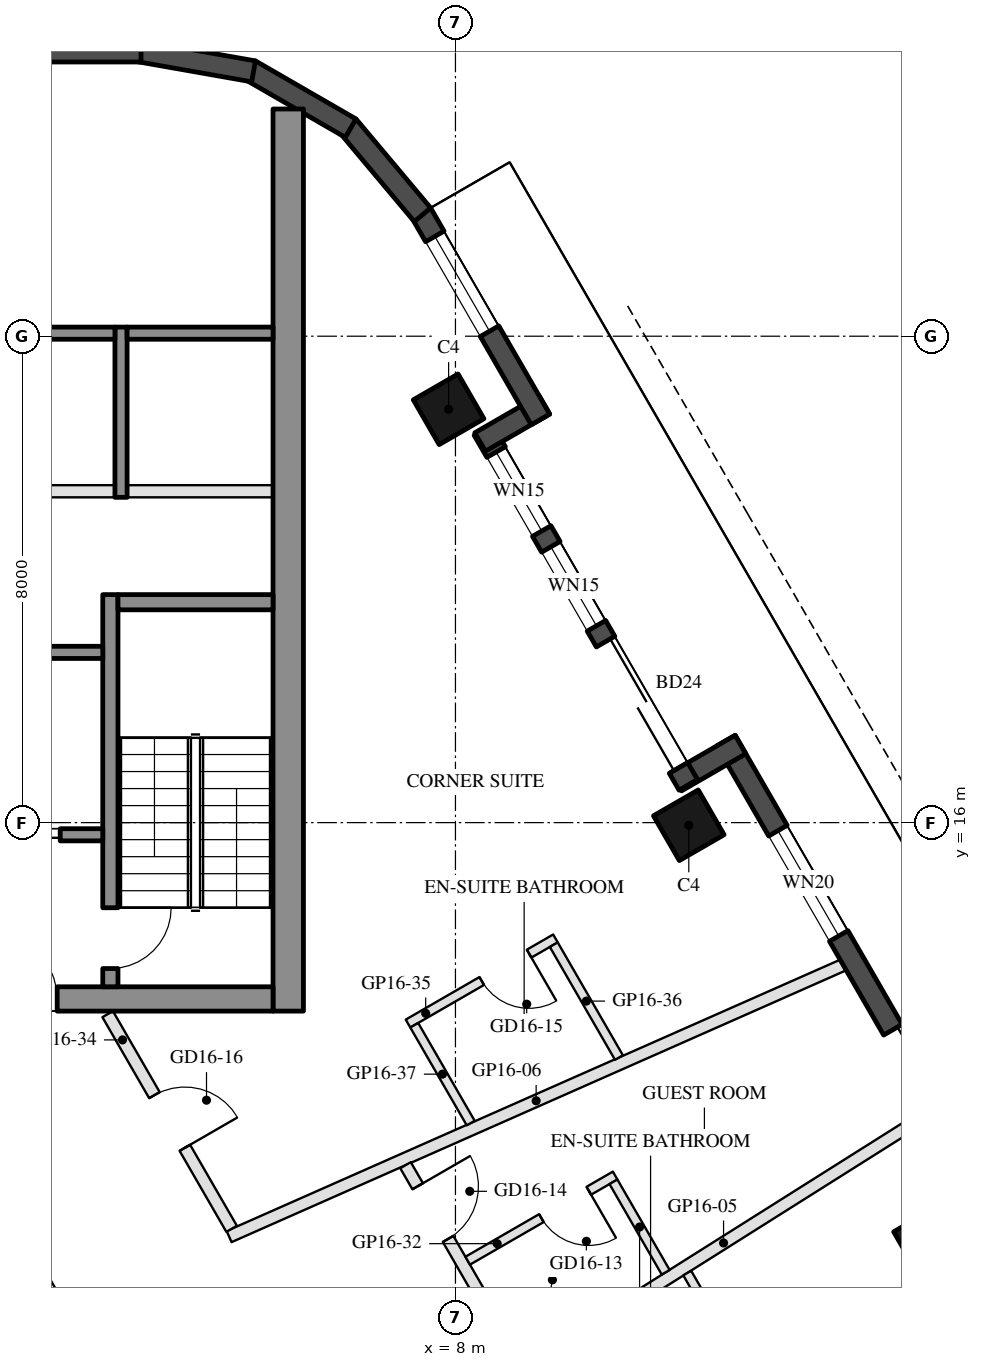
"""IFC4 building model, lengths in metres.
Left out: names, types, materials, properties, quantities, classifications, styles, units other than length and angle.
Written with IfcOpenShell. Run it as: python <this file> out.ifc"""

import sys

from ifc_helpers import new_model, si_unit, direction, frame, frame_2d, origin, origin_2d, place, context, subcontext, project, spatial, rectangle, hollow_rectangle, extrude, element, fill, save


model = new_model("IFC4")
c1 = context("Model", 3, precision=1e-05, world=origin(), true_north=direction((0.0, 1.0)))
c2 = subcontext(c1, "Body", "Model", "MODEL_VIEW")
j1 = project(units=[si_unit("LENGTHUNIT", "METRE"), si_unit("PLANEANGLEUNIT", "RADIAN")], contexts=[c1])
p1 = place(None, origin())
s1 = spatial("IfcSite", under=j1, at=p1, CompositionType="ELEMENT")
p2 = place(p1, origin())
s2 = spatial("IfcBuilding", under=s1, at=p2, CompositionType="ELEMENT")
p3 = place(p2, frame((0.0, 0.0, 176.2)))
s3 = spatial("IfcBuildingStorey", under=s2, at=p3, CompositionType="ELEMENT", Elevation=176.2)
for number, where, z_axis, x_axis in (
    (1, (15.788, 9.115, 0.0), (0.0, 0.0, 1.0), (-0.5, 0.866, 0.0)),
    (2, (11.838, 15.957, 0.0), (0.0, 0.0, 1.0), (-0.5, 0.866, 0.0)),
    (3, (7.888, 22.798, 0.0), (0.0, 0.0, 1.0), (-0.5, 0.866, 0.0)),
):
    element("IfcColumn", number, at=place(p3, frame(where, z_axis=z_axis, x_axis=x_axis)), inside=s3, PredefinedType="COLUMN", context=c2, shape_type="SweptSolid", body=[
        extrude(hollow_rectangle(XDim=0.85, YDim=0.85, WallThickness=0.04, at=origin_2d()), origin(), (0.0, 0.0, 1.0), 3.7),
    ])
p4 = place(p3, frame((17.299, 8.948, 0.0), z_axis=(0.0, 0.0, 1.0), x_axis=(-0.500010041276, 0.866019606374, 0.0)))
e4 = element("IfcWall", 4, at=p4, inside=s3, PredefinedType="SOLIDWALL", context=c2, shape_type="SweptSolid", body=[
    extrude(rectangle(XDim=9.7, YDim=0.35, at=frame_2d((4.85, 0.0))), origin(), (0.0, 0.0, 1.0), 3.55),
])
p5 = place(p4, frame((3.21, 0.0, 0.0)))
e5 = element("IfcOpeningElement", 5, at=p5, cuts=e4, PredefinedType="OPENING", context=c2, shape_type="SweptSolid", body=[
    extrude(rectangle(XDim=1.0, YDim=2.4, at=frame_2d((0.5, 1.2))), frame((0.0, 0.185, 0.0), z_axis=(0.0, -1.0, 0.0), x_axis=(1.0, 0.0, 0.0)), (0.0, 0.0, 1.0), 0.37),
])
p6 = place(p4, frame((5.99, 0.0, 0.3)))
e6 = element("IfcOpeningElement", 6, at=p6, cuts=e4, PredefinedType="OPENING", context=c2, shape_type="SweptSolid", body=[
    extrude(rectangle(XDim=2.0, YDim=2.65, at=frame_2d((1.0, 1.325))), frame((0.0, 0.185, 0.0), z_axis=(0.0, -1.0, 0.0), x_axis=(1.0, 0.0, 0.0)), (0.0, 0.0, 1.0), 0.37),
])
p7 = place(p3, frame((12.688, 17.284, 0.0), z_axis=(0.0, 0.0, 1.0), x_axis=(-0.865955602162, -0.500120880472, 0.0)))
e7 = element("IfcWall", 7, at=p7, inside=s3, PredefinedType="SOLIDWALL", context=c2, shape_type="SweptSolid", body=[
    extrude(rectangle(XDim=1.22, YDim=0.35, at=frame_2d((0.61, 0.0))), origin(), (0.0, 0.0, 1.0), 3.55),
])
p8 = place(p3, frame((11.829, 16.621, 0.0), z_axis=(0.0, 0.0, 1.0), x_axis=(-0.500003597184, 0.866023326939, 0.0)))
e8 = element("IfcWall", 8, at=p8, inside=s3, PredefinedType="SOLIDWALL", context=c2, shape_type="SweptSolid", body=[
    extrude(rectangle(XDim=6.74, YDim=0.35, at=frame_2d((3.37, 0.0))), origin(), (0.0, 0.0, 1.0), 3.55),
])
p9 = place(p8, frame((0.32, 0.0, 0.0)))
e9 = element("IfcOpeningElement", 9, at=p9, cuts=e8, PredefinedType="OPENING", context=c2, shape_type="SweptSolid", body=[
    extrude(rectangle(XDim=2.4, YDim=2.4, at=frame_2d((1.2, 1.2))), frame((0.0, 0.185, 0.0), z_axis=(0.0, -1.0, 0.0), x_axis=(1.0, 0.0, 0.0)), (0.0, 0.0, 1.0), 0.37),
])
p10 = place(p8, frame((3.02, 0.0, 0.3)))
e10 = element("IfcOpeningElement", 10, at=p10, cuts=e8, PredefinedType="OPENING", context=c2, shape_type="SweptSolid", body=[
    extrude(rectangle(XDim=1.5, YDim=2.65, at=frame_2d((0.75, 1.325))), frame((0.0, 0.185, 0.0), z_axis=(0.0, -1.0, 0.0), x_axis=(1.0, 0.0, 0.0)), (0.0, 0.0, 1.0), 0.37),
])
p11 = place(p8, frame((4.82, 0.0, 0.3)))
e11 = element("IfcOpeningElement", 11, at=p11, cuts=e8, PredefinedType="OPENING", context=c2, shape_type="SweptSolid", body=[
    extrude(rectangle(XDim=1.5, YDim=2.65, at=frame_2d((0.75, 1.325))), frame((0.0, 0.185, 0.0), z_axis=(0.0, -1.0, 0.0), x_axis=(1.0, 0.0, 0.0)), (0.0, 0.0, 1.0), 0.37),
])
p12 = place(p3, frame((8.406, 22.26, 0.0), z_axis=(0.0, 0.0, 1.0), x_axis=(0.865955602162, 0.500120880472, 0.0)))
e12 = element("IfcWall", 12, at=p12, inside=s3, PredefinedType="SOLIDWALL", context=c2, shape_type="SweptSolid", body=[
    extrude(rectangle(XDim=1.22, YDim=0.35, at=frame_2d((0.61, 0.0))), origin(), (0.0, 0.0, 1.0), 3.55),
])
p13 = place(p3, frame((9.398, 22.631, 0.0), z_axis=(0.0, 0.0, 1.0), x_axis=(-0.499954521343, 0.866051659307, 0.0)))
e13 = element("IfcWall", 13, at=p13, inside=s3, PredefinedType="SOLIDWALL", context=c2, shape_type="SweptSolid", body=[
    extrude(rectangle(XDim=3.916, YDim=0.35, at=frame_2d((1.958, 0.0))), origin(), (0.0, 0.0, 1.0), 3.55),
])
p14 = place(p13, frame((1.675, 0.0, 0.3)))
e14 = element("IfcOpeningElement", 14, at=p14, cuts=e13, PredefinedType="OPENING", context=c2, shape_type="SweptSolid", body=[
    extrude(rectangle(XDim=1.8, YDim=2.65, at=frame_2d((0.9, 1.325))), frame((0.0, 0.185, 0.0), z_axis=(0.0, -1.0, 0.0), x_axis=(1.0, 0.0, 0.0)), (0.0, 0.0, 1.0), 0.37),
])
p15 = place(p3, frame((7.458, 25.998, 0.0), z_axis=(0.0, 0.0, 1.0), x_axis=(-0.642808304945, 0.766027077259, 0.0)))
e15 = element("IfcWall", 15, at=p15, inside=s3, PredefinedType="SOLIDWALL", context=c2, shape_type="SweptSolid", body=[
    extrude(rectangle(XDim=1.91, YDim=0.35, at=frame_2d((0.955, 0.0))), origin(), (0.0, 0.0, 1.0), 3.55),
])
for number, where, z_axis, x_axis in (
    (16, (6.277, 27.422, 0.0), (0.0, 0.0, 1.0), (-0.866, 0.5, 0.0)),
    (17, (4.68, 28.356, 0.0), (0.0, 0.0, 1.0), (-0.985, 0.174, 0.0)),
):
    element("IfcWall", number, at=place(p3, frame(where, z_axis=z_axis, x_axis=x_axis)), inside=s3, PredefinedType="SOLIDWALL", context=c2, shape_type="SweptSolid", body=[
        extrude(rectangle(XDim=1.91, YDim=0.35, at=frame_2d((0.955, 0.0))), origin(), (0.0, 0.0, 1.0), 3.55),
    ])
p16 = place(p3, frame((2.829, 28.685, 0.0), z_axis=(0.0, 0.0, 1.0), x_axis=(-1.0, 0.0, 0.0)))
e18 = element("IfcWall", 18, at=p16, inside=s3, PredefinedType="SOLIDWALL", context=c2, shape_type="SweptSolid", body=[
    extrude(rectangle(XDim=5.658, YDim=0.35, at=frame_2d((2.829, 0.0))), origin(), (0.0, 0.0, 1.0), 3.55),
])
p17 = place(p3, frame((5.25, 12.9, 0.0), z_axis=(0.0, 0.0, 1.0), x_axis=(0.0, 1.0, 0.0)))
e19 = element("IfcWall", 19, at=p17, inside=s3, PredefinedType="SHEAR", context=c2, shape_type="SweptSolid", body=[
    extrude(rectangle(XDim=14.837, YDim=0.5, at=frame_2d((7.418, 0.0))), origin(), (0.0, 0.0, 1.0), 3.5),
])
p18 = place(p3, frame((5.0, 13.1, 0.0), z_axis=(0.0, 0.0, 1.0), x_axis=(-1.0, 0.0, 0.0)))
e20 = element("IfcWall", 20, at=p18, inside=s3, PredefinedType="SHEAR", context=c2, shape_type="SweptSolid", body=[
    extrude(rectangle(XDim=10.0, YDim=0.4, at=frame_2d((5.0, 0.0))), origin(), (0.0, 0.0, 1.0), 3.5),
])
p19 = place(p18, frame((3.55, 0.0, 0.0)))
e21 = element("IfcOpeningElement", 21, at=p19, cuts=e20, PredefinedType="OPENING", context=c2, shape_type="SweptSolid", body=[
    extrude(rectangle(XDim=1.1, YDim=2.1, at=frame_2d((0.55, 1.05))), frame((0.0, 0.21, 0.0), z_axis=(0.0, -1.0, 0.0), x_axis=(1.0, 0.0, 0.0)), (0.0, 0.0, 1.0), 0.42),
])
p20 = place(p18, frame((5.85, 0.0, 0.0)))
e22 = element("IfcOpeningElement", 22, at=p20, cuts=e20, PredefinedType="OPENING", context=c2, shape_type="SweptSolid", body=[
    extrude(rectangle(XDim=1.4, YDim=2.1, at=frame_2d((0.7, 1.05))), frame((0.0, 0.21, 0.0), z_axis=(0.0, -1.0, 0.0), x_axis=(1.0, 0.0, 0.0)), (0.0, 0.0, 1.0), 0.42),
])
p21 = place(p3, frame((2.325, 13.3, 0.0), z_axis=(0.0, 0.0, 1.0), x_axis=(0.0, 1.0, 0.0)))
e23 = element("IfcWall", 23, at=p21, inside=s3, PredefinedType="SHEAR", context=c2, shape_type="SweptSolid", body=[
    extrude(rectangle(XDim=6.45, YDim=0.25, at=frame_2d((3.225, 0.0))), origin(), (0.0, 0.0, 1.0), 3.5),
])
p22 = place(p21, frame((0.3, 0.0, 0.0)))
e24 = element("IfcOpeningElement", 24, at=p22, cuts=e23, PredefinedType="OPENING", context=c2, shape_type="SweptSolid", body=[
    extrude(rectangle(XDim=1.0, YDim=2.1, at=frame_2d((0.5, 1.05))), frame((0.0, 0.135, 0.0), z_axis=(0.0, -1.0, 0.0), x_axis=(1.0, 0.0, 0.0)), (0.0, 0.0, 1.0), 0.27),
])
p23 = place(p3, frame((5.0, 19.625, 0.0), z_axis=(0.0, 0.0, 1.0), x_axis=(-1.0, 0.0, 0.0)))
e25 = element("IfcWall", 25, at=p23, inside=s3, PredefinedType="SHEAR", context=c2, shape_type="SweptSolid", body=[
    extrude(rectangle(XDim=2.55, YDim=0.25, at=frame_2d((1.275, 0.0))), origin(), (0.0, 0.0, 1.0), 3.5),
])
p24 = place(p3, frame((2.2, 18.8, 0.0), z_axis=(0.0, 0.0, 1.0), x_axis=(-1.0, 0.0, 0.0)))
e26 = element("IfcWall", 26, at=p24, inside=s3, PredefinedType="SHEAR", context=c2, shape_type="SweptSolid", body=[
    extrude(rectangle(XDim=2.8, YDim=0.2, at=frame_2d((1.4, 0.0))), origin(), (0.0, 0.0, 1.0), 3.5),
])
p25 = place(p3, frame((2.2, 15.8, 0.0), z_axis=(0.0, 0.0, 1.0), x_axis=(-1.0, 0.0, 0.0)))
e27 = element("IfcWall", 27, at=p25, inside=s3, PredefinedType="SHEAR", context=c2, shape_type="SweptSolid", body=[
    extrude(rectangle(XDim=2.8, YDim=0.2, at=frame_2d((1.4, 0.0))), origin(), (0.0, 0.0, 1.0), 3.5),
])
p26 = place(p25, frame((0.7, 0.0, 0.0)))
e28 = element("IfcOpeningElement", 28, at=p26, cuts=e27, PredefinedType="OPENING", context=c2, shape_type="SweptSolid", body=[
    extrude(rectangle(XDim=1.2, YDim=2.1, at=frame_2d((0.6, 1.05))), frame((0.0, 0.11, 0.0), z_axis=(0.0, -1.0, 0.0), x_axis=(1.0, 0.0, 0.0)), (0.0, 0.0, 1.0), 0.22),
])
p27 = place(p3, frame((2.5, 21.35, 0.0), z_axis=(0.0, 0.0, 1.0), x_axis=(0.0, 1.0, 0.0)))
e29 = element("IfcWall", 29, at=p27, inside=s3, PredefinedType="SHEAR", context=c2, shape_type="SweptSolid", body=[
    extrude(rectangle(XDim=2.8, YDim=0.2, at=frame_2d((1.4, 0.0))), origin(), (0.0, 0.0, 1.0), 3.5),
])
p28 = place(p3, frame((5.0, 24.05, 0.0), z_axis=(0.0, 0.0, 1.0), x_axis=(-1.0, 0.0, 0.0)))
e30 = element("IfcWall", 30, at=p28, inside=s3, PredefinedType="SHEAR", context=c2, shape_type="SweptSolid", body=[
    extrude(rectangle(XDim=2.4, YDim=0.2, at=frame_2d((1.2, 0.0))), origin(), (0.0, 0.0, 1.0), 3.5),
])
p29 = place(p3, frame((2.4, 24.05, 0.0), z_axis=(0.0, 0.0, 1.0), x_axis=(-1.0, 0.0, 0.0)))
e31 = element("IfcWall", 31, at=p29, inside=s3, PredefinedType="SHEAR", context=c2, shape_type="SweptSolid", body=[
    extrude(rectangle(XDim=2.8, YDim=0.2, at=frame_2d((1.4, 0.0))), origin(), (0.0, 0.0, 1.0), 3.5),
])
p30 = place(p3, frame((5.0, 21.45, 0.0), z_axis=(0.0, 0.0, 1.0), x_axis=(-1.0, 0.0, 0.0)))
e32 = element("IfcWall", 32, at=p30, inside=s3, PredefinedType="PARTITIONING", context=c2, shape_type="SweptSolid", body=[
    extrude(rectangle(XDim=2.4, YDim=0.2, at=frame_2d((1.2, 0.0))), origin(), (0.0, 0.0, 1.0), 3.5),
])
p31 = place(p3, frame((2.4, 21.45, 0.0), z_axis=(0.0, 0.0, 1.0), x_axis=(-1.0, 0.0, 0.0)))
e33 = element("IfcWall", 33, at=p31, inside=s3, PredefinedType="PARTITIONING", context=c2, shape_type="SweptSolid", body=[
    extrude(rectangle(XDim=2.8, YDim=0.2, at=frame_2d((1.4, 0.0))), origin(), (0.0, 0.0, 1.0), 3.5),
])
p32 = place(p3, frame((15.787, 11.216, 0.0), z_axis=(0.0, 0.0, 1.0), x_axis=(-0.845894721315, -0.533349904332, 0.0)))
e34 = element("IfcWall", 34, at=p32, inside=s3, PredefinedType="PARTITIONING", context=c2, shape_type="SweptSolid", body=[
    extrude(rectangle(XDim=7.986, YDim=0.2, at=frame_2d((3.993, 0.0))), origin(), (0.0, 0.0, 1.0), 3.06),
])
p33 = place(p3, frame((14.377, 13.658, 0.0), z_axis=(0.0, 0.0, 1.0), x_axis=(-0.914546661299, -0.404480412762, 0.0)))
e35 = element("IfcWall", 35, at=p33, inside=s3, PredefinedType="PARTITIONING", context=c2, shape_type="SweptSolid", body=[
    extrude(rectangle(XDim=11.043, YDim=0.2, at=frame_2d((5.521, 0.0))), origin(), (0.0, 0.0, 1.0), 3.06),
])
p34 = place(p3, frame((13.296, 6.021, 0.0), z_axis=(0.0, 0.0, 1.0), x_axis=(-0.499978799242, 0.866037643702, 0.0)))
e36 = element("IfcWall", 36, at=p34, inside=s3, PredefinedType="PARTITIONING", context=c2, shape_type="SweptSolid", body=[
    extrude(rectangle(XDim=2.968, YDim=0.15, at=frame_2d((1.484, 0.0))), origin(), (0.0, 0.0, 1.0), 2.95),
])
p35 = place(p3, frame((7.179, 10.365, 0.0), z_axis=(0.0, 0.0, 1.0), x_axis=(0.500021083992, -0.866013230594, 0.0)))
e37 = element("IfcWall", 37, at=p35, inside=s3, PredefinedType="PARTITIONING", context=c2, shape_type="SweptSolid", body=[
    extrude(rectangle(XDim=3.774, YDim=0.2, at=frame_2d((1.887, 0.0))), origin(), (0.0, 0.0, 1.0), 2.95),
])
p36 = place(p35, frame((0.4, 0.0, 0.0)))
e38 = element("IfcOpeningElement", 38, at=p36, cuts=e37, PredefinedType="OPENING", context=c2, shape_type="SweptSolid", body=[
    extrude(rectangle(XDim=1.0, YDim=2.1, at=frame_2d((0.5, 1.05))), frame((0.0, 0.11, 0.0), z_axis=(0.0, -1.0, 0.0), x_axis=(1.0, 0.0, 0.0)), (0.0, 0.0, 1.0), 0.22),
])
p37 = place(p3, frame((10.626, 10.195, 0.0), z_axis=(0.0, 0.0, 1.0), x_axis=(-0.865996816683, -0.500049511043, 0.0)))
e39 = element("IfcWall", 39, at=p37, inside=s3, PredefinedType="PARTITIONING", context=c2, shape_type="SweptSolid", body=[
    extrude(rectangle(XDim=2.8, YDim=0.15, at=frame_2d((1.4, 0.0))), origin(), (0.0, 0.0, 1.0), 3.55),
])
p38 = place(p37, frame((0.5, 0.0, 0.0)))
e40 = element("IfcOpeningElement", 40, at=p38, cuts=e39, PredefinedType="OPENING", context=c2, shape_type="SweptSolid", body=[
    extrude(rectangle(XDim=0.9, YDim=2.1, at=frame_2d((0.45, 1.05))), frame((0.0, 0.085, 0.0), z_axis=(0.0, -1.0, 0.0), x_axis=(1.0, 0.0, 0.0)), (0.0, 0.0, 1.0), 0.17),
])
p39 = place(p3, frame((11.458, 8.605, 0.0), z_axis=(0.0, 0.0, 1.0), x_axis=(-0.499898763811, 0.866083844636, 0.0)))
e41 = element("IfcWall", 41, at=p39, inside=s3, PredefinedType="PARTITIONING", context=c2, shape_type="SweptSolid", body=[
    extrude(rectangle(XDim=1.718, YDim=0.15, at=frame_2d((0.859, 0.0))), origin(), (0.0, 0.0, 1.0), 3.55),
])
p40 = place(p3, frame((2.281, 12.85, 0.0), z_axis=(0.0, 0.0, 1.0), x_axis=(0.499971273698, -0.866041988288, 0.0)))
e42 = element("IfcWall", 42, at=p40, inside=s3, PredefinedType="PARTITIONING", context=c2, shape_type="SweptSolid", body=[
    extrude(rectangle(XDim=4.077, YDim=0.2, at=frame_2d((2.039, 0.0))), origin(), (0.0, 0.0, 1.0), 2.95),
])
p41 = place(p40, frame((1.538, 0.0, 0.0)))
e43 = element("IfcOpeningElement", 43, at=p41, cuts=e42, PredefinedType="OPENING", context=c2, shape_type="SweptSolid", body=[
    extrude(rectangle(XDim=1.0, YDim=2.1, at=frame_2d((0.5, 1.05))), frame((0.0, 0.11, 0.0), z_axis=(0.0, -1.0, 0.0), x_axis=(1.0, 0.0, 0.0)), (0.0, 0.0, 1.0), 0.22),
])
p42 = place(p3, frame((9.645, 14.095, 0.0), z_axis=(0.0, 0.0, 1.0), x_axis=(-0.865996816683, -0.500049511043, 0.0)))
e44 = element("IfcWall", 44, at=p42, inside=s3, PredefinedType="PARTITIONING", context=c2, shape_type="SweptSolid", body=[
    extrude(rectangle(XDim=2.8, YDim=0.15, at=frame_2d((1.4, 0.0))), origin(), (0.0, 0.0, 1.0), 3.55),
])
p43 = place(p42, frame((0.5, 0.0, 0.0)))
e45 = element("IfcOpeningElement", 45, at=p43, cuts=e44, PredefinedType="OPENING", context=c2, shape_type="SweptSolid", body=[
    extrude(rectangle(XDim=0.9, YDim=2.1, at=frame_2d((0.45, 1.05))), frame((0.0, 0.085, 0.0), z_axis=(0.0, -1.0, 0.0), x_axis=(1.0, 0.0, 0.0)), (0.0, 0.0, 1.0), 0.17),
])
p44 = place(p3, frame((10.689, 12.136, 0.0), z_axis=(0.0, 0.0, 1.0), x_axis=(-0.499949244157, 0.866054705701, 0.0)))
e46 = element("IfcWall", 46, at=p44, inside=s3, PredefinedType="PARTITIONING", context=c2, shape_type="SweptSolid", body=[
    extrude(rectangle(XDim=2.143, YDim=0.15, at=frame_2d((1.072, 0.0))), origin(), (0.0, 0.0, 1.0), 3.55),
])
p45 = place(p3, frame((8.251, 11.059, 0.0), z_axis=(0.0, 0.0, 1.0), x_axis=(-0.500025795397, 0.866010510293, 0.0)))
e47 = element("IfcWall", 47, at=p45, inside=s3, PredefinedType="PARTITIONING", context=c2, shape_type="SweptSolid", body=[
    extrude(rectangle(XDim=1.858, YDim=0.15, at=frame_2d((0.929, 0.0))), origin(), (0.0, 0.0, 1.0), 3.55),
])
p46 = place(p5, frame((1.0, 0.0, 0.0), z_axis=(0.0, 0.0, 1.0), x_axis=(-1.0, 0.0, 0.0)))
e48 = element("IfcDoor", 48, at=p46, inside=s3, OperationType="SLIDING_TO_LEFT", PredefinedType="DOOR", context=c2, shape_type="SweptSolid", body=[
    extrude(rectangle(XDim=1.0, YDim=2.4, at=frame_2d((0.5, 1.2))), frame((0.0, 0.025, 0.0), z_axis=(0.0, -1.0, 0.0), x_axis=(1.0, 0.0, 0.0)), (0.0, 0.0, 1.0), 0.05),
])
fill(e5, e48)
p47 = place(p6, origin())
e49 = element("IfcWindow", 49, at=p47, inside=s3, PartitioningType="SINGLE_PANEL", PredefinedType="WINDOW", context=c2, shape_type="SweptSolid", body=[
    extrude(rectangle(XDim=2.0, YDim=2.65, at=frame_2d((1.0, 1.325))), frame((0.0, 0.03, 0.0), z_axis=(0.0, -1.0, 0.0), x_axis=(1.0, 0.0, 0.0)), (0.0, 0.0, 1.0), 0.06),
])
fill(e6, e49)
p48 = place(p9, frame((2.4, 0.0, 0.0), z_axis=(0.0, 0.0, 1.0), x_axis=(-1.0, 0.0, 0.0)))
e50 = element("IfcDoor", 50, at=p48, inside=s3, OperationType="SLIDING_TO_LEFT", PredefinedType="DOOR", context=c2, shape_type="SweptSolid", body=[
    extrude(rectangle(XDim=2.4, YDim=2.4, at=frame_2d((1.2, 1.2))), frame((0.0, 0.025, 0.0), z_axis=(0.0, -1.0, 0.0), x_axis=(1.0, 0.0, 0.0)), (0.0, 0.0, 1.0), 0.05),
])
fill(e9, e50)
p49 = place(p10, origin())
e51 = element("IfcWindow", 51, at=p49, inside=s3, PartitioningType="SINGLE_PANEL", PredefinedType="WINDOW", context=c2, shape_type="SweptSolid", body=[
    extrude(rectangle(XDim=1.5, YDim=2.65, at=frame_2d((0.75, 1.325))), frame((0.0, 0.03, 0.0), z_axis=(0.0, -1.0, 0.0), x_axis=(1.0, 0.0, 0.0)), (0.0, 0.0, 1.0), 0.06),
])
fill(e10, e51)
p50 = place(p11, origin())
e52 = element("IfcWindow", 52, at=p50, inside=s3, PartitioningType="SINGLE_PANEL", PredefinedType="WINDOW", context=c2, shape_type="SweptSolid", body=[
    extrude(rectangle(XDim=1.5, YDim=2.65, at=frame_2d((0.75, 1.325))), frame((0.0, 0.03, 0.0), z_axis=(0.0, -1.0, 0.0), x_axis=(1.0, 0.0, 0.0)), (0.0, 0.0, 1.0), 0.06),
])
fill(e11, e52)
p51 = place(p14, origin())
e53 = element("IfcWindow", 53, at=p51, inside=s3, PartitioningType="SINGLE_PANEL", PredefinedType="WINDOW", context=c2, shape_type="SweptSolid", body=[
    extrude(rectangle(XDim=1.8, YDim=2.65, at=frame_2d((0.9, 1.325))), frame((0.0, 0.03, 0.0), z_axis=(0.0, -1.0, 0.0), x_axis=(1.0, 0.0, 0.0)), (0.0, 0.0, 1.0), 0.06),
])
fill(e14, e53)
p52 = place(p26, origin())
e54 = element("IfcDoor", 54, at=p52, inside=s3, OperationType="DOUBLE_DOOR_SLIDING", PredefinedType="DOOR", context=c2, shape_type="SweptSolid", body=[
    extrude(rectangle(XDim=1.2, YDim=2.1, at=frame_2d((0.6, 1.05))), frame((0.0, 0.025, 0.0), z_axis=(0.0, -1.0, 0.0), x_axis=(1.0, 0.0, 0.0)), (0.0, 0.0, 1.0), 0.05),
])
fill(e28, e54)
p53 = place(p19, frame((1.1, 0.0, 0.0), z_axis=(0.0, 0.0, 1.0), x_axis=(-1.0, 0.0, 0.0)))
e55 = element("IfcDoor", 55, at=p53, inside=s3, OperationType="SINGLE_SWING_LEFT", PredefinedType="DOOR", context=c2, shape_type="SweptSolid", body=[
    extrude(rectangle(XDim=1.1, YDim=2.1, at=frame_2d((0.55, 1.05))), frame((0.0, 0.025, 0.0), z_axis=(0.0, -1.0, 0.0), x_axis=(1.0, 0.0, 0.0)), (0.0, 0.0, 1.0), 0.05),
])
fill(e21, e55)
p54 = place(p22, frame((1.0, 0.0, 0.0), z_axis=(0.0, 0.0, 1.0), x_axis=(-1.0, 0.0, 0.0)))
e56 = element("IfcDoor", 56, at=p54, inside=s3, OperationType="SINGLE_SWING_LEFT", PredefinedType="DOOR", context=c2, shape_type="SweptSolid", body=[
    extrude(rectangle(XDim=1.0, YDim=2.1, at=frame_2d((0.5, 1.05))), frame((0.0, 0.025, 0.0), z_axis=(0.0, -1.0, 0.0), x_axis=(1.0, 0.0, 0.0)), (0.0, 0.0, 1.0), 0.05),
])
fill(e24, e56)
p55 = place(p38, origin())
e57 = element("IfcDoor", 57, at=p55, inside=s3, OperationType="SINGLE_SWING_LEFT", PredefinedType="DOOR", context=c2, shape_type="SweptSolid", body=[
    extrude(rectangle(XDim=0.9, YDim=2.1, at=frame_2d((0.45, 1.05))), frame((0.0, 0.025, 0.0), z_axis=(0.0, -1.0, 0.0), x_axis=(1.0, 0.0, 0.0)), (0.0, 0.0, 1.0), 0.05),
])
fill(e40, e57)
p56 = place(p36, origin())
e58 = element("IfcDoor", 58, at=p56, inside=s3, OperationType="SINGLE_SWING_LEFT", PredefinedType="DOOR", context=c2, shape_type="SweptSolid", body=[
    extrude(rectangle(XDim=1.0, YDim=2.1, at=frame_2d((0.5, 1.05))), frame((0.0, 0.025, 0.0), z_axis=(0.0, -1.0, 0.0), x_axis=(1.0, 0.0, 0.0)), (0.0, 0.0, 1.0), 0.05),
])
fill(e38, e58)
p57 = place(p43, origin())
e59 = element("IfcDoor", 59, at=p57, inside=s3, OperationType="SINGLE_SWING_LEFT", PredefinedType="DOOR", context=c2, shape_type="SweptSolid", body=[
    extrude(rectangle(XDim=0.9, YDim=2.1, at=frame_2d((0.45, 1.05))), frame((0.0, 0.025, 0.0), z_axis=(0.0, -1.0, 0.0), x_axis=(1.0, 0.0, 0.0)), (0.0, 0.0, 1.0), 0.05),
])
fill(e45, e59)
p58 = place(p41, origin())
e60 = element("IfcDoor", 60, at=p58, inside=s3, OperationType="SINGLE_SWING_RIGHT", PredefinedType="DOOR", context=c2, shape_type="SweptSolid", body=[
    extrude(rectangle(XDim=1.0, YDim=2.1, at=frame_2d((0.5, 1.05))), frame((0.0, 0.025, 0.0), z_axis=(0.0, -1.0, 0.0), x_axis=(1.0, 0.0, 0.0)), (0.0, 0.0, 1.0), 0.05),
])
fill(e43, e60)
save(model, sys.argv[1])
